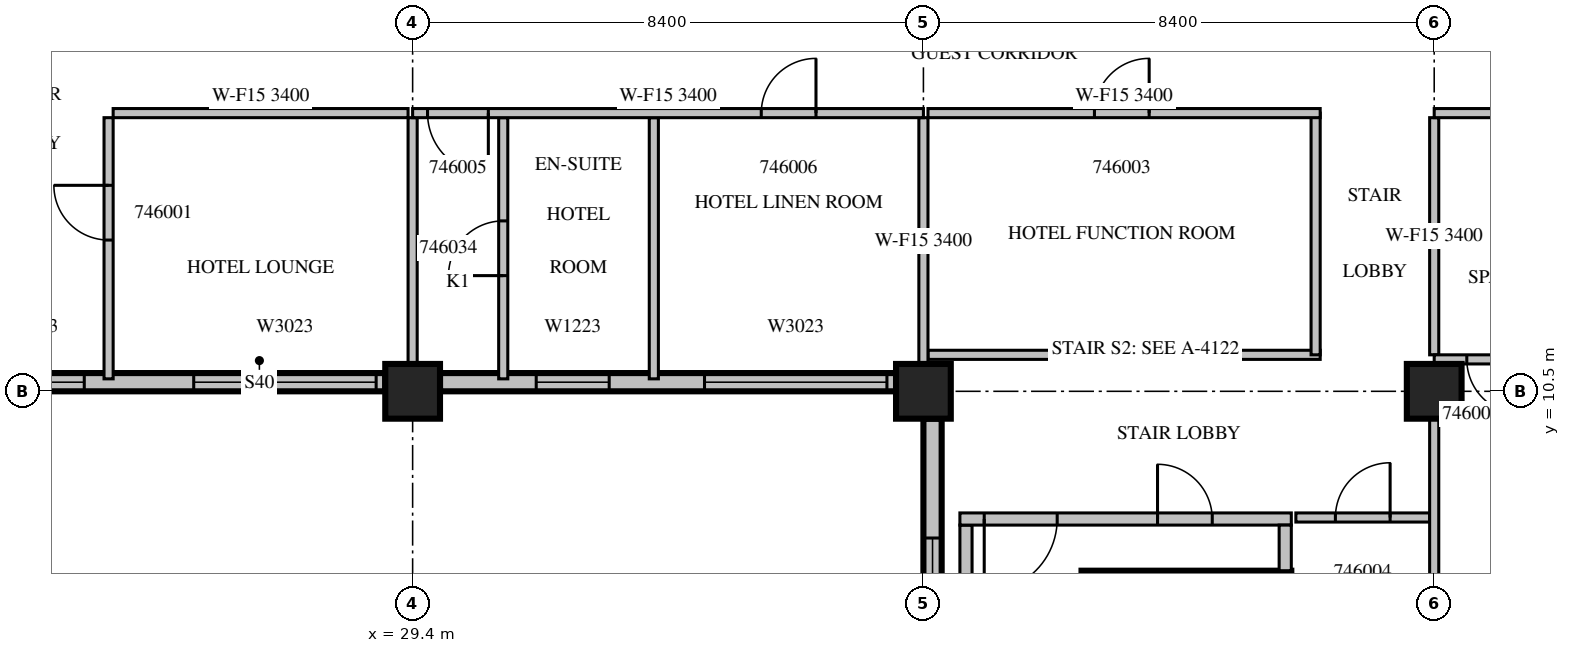
"""IFC4 building model, lengths in metres.
Left out: names, types, materials, properties, quantities, classifications, styles, units other than length and angle.
Written with IfcOpenShell. Run it as: python <this file> out.ifc"""

import sys

from ifc_helpers import new_model, si_unit, direction, frame, frame_2d, origin, origin_2d, place, context, subcontext, project, spatial, rectangle, extrude, source, transform, mapped, element, fill, save


model = new_model("IFC4")
c1 = context("Model", 3, precision=1e-05, world=origin(), true_north=direction((0.0, 1.0)))
c2 = subcontext(c1, "Body", "Model", "MODEL_VIEW")
j1 = project(units=[si_unit("LENGTHUNIT", "METRE"), si_unit("PLANEANGLEUNIT", "RADIAN")], contexts=[c1])
p1 = place(None, origin())
s1 = spatial("IfcSite", under=j1, at=p1, CompositionType="ELEMENT")
p2 = place(p1, origin())
s2 = spatial("IfcBuilding", under=s1, at=p2, CompositionType="ELEMENT")
p3 = place(p2, frame((0.0, 0.0, 208.2)))
s3 = spatial("IfcBuildingStorey", under=s2, at=p3, CompositionType="ELEMENT", Elevation=208.2)
m1 = source(origin(), c2, "Body", "SweptSolid", [
    extrude(rectangle(XDim=0.9, YDim=0.9, at=origin_2d()), origin(), (0.0, 0.0, 1.0), 3.8),
])
for number, where, z_axis, x_axis in (
    (1, (29.4, 10.5, 0.0), (0.0, 0.0, 1.0), (1.0, 0.0, 0.0)),
    (2, (37.8, 10.5, 0.0), (0.0, 0.0, 1.0), (1.0, 0.0, 0.0)),
    (3, (46.2, 10.5, 0.0), (0.0, 0.0, 1.0), (1.0, 0.0, 0.0)),
):
    element("IfcColumn", number, at=place(p3, frame(where, z_axis=z_axis, x_axis=x_axis)), inside=s3, PredefinedType="COLUMN", context=c2, shape_type="MappedRepresentation", body=[
        mapped(m1, transform((0.0, 0.0, 0.0), scale=1.0)),
    ])
m2 = source(origin(), c2, "Body", "SweptSolid", [
    extrude(rectangle(XDim=7.15, YDim=0.3, at=frame_2d((3.575, 0.0))), origin(), (0.0, 0.0, 1.0), 3.4),
])
p4 = place(p3, frame((21.8, 10.65, 0.0), z_axis=(0.0, 0.0, 1.0), x_axis=(1.0, 0.0, 0.0)))
e4 = element("IfcWall", 4, at=p4, inside=s3, PredefinedType="STANDARD", context=c2, shape_type="MappedRepresentation", body=[
    mapped(m2, transform((0.0, 0.0, 0.0), scale=1.0)),
])
m3 = source(origin(), c2, "Body", "SweptSolid", [
    extrude(rectangle(XDim=1.8, YDim=2.3, at=frame_2d((0.9, 1.15))), frame((0.0, 0.16, 0.0), z_axis=(0.0, -1.0, 0.0), x_axis=(1.0, 0.0, 0.0)), (0.0, 0.0, 1.0), 0.32),
])
p5 = place(p4, frame((0.4, 0.0, 0.6)))
e5 = element("IfcOpeningElement", 5, at=p5, cuts=e4, PredefinedType="OPENING", context=c2, shape_type="MappedRepresentation", body=[
    mapped(m3, transform((0.0, 0.0, 0.0), scale=1.0)),
])
m4 = source(origin(), c2, "Body", "SweptSolid", [
    extrude(rectangle(XDim=3.0, YDim=2.3, at=frame_2d((1.5, 1.15))), frame((0.0, 0.16, 0.0), z_axis=(0.0, -1.0, 0.0), x_axis=(1.0, 0.0, 0.0)), (0.0, 0.0, 1.0), 0.32),
])
p6 = place(p4, frame((4.0, 0.0, 0.6)))
e6 = element("IfcOpeningElement", 6, at=p6, cuts=e4, PredefinedType="OPENING", context=c2, shape_type="MappedRepresentation", body=[
    mapped(m4, transform((0.0, 0.0, 0.0), scale=1.0)),
])
m5 = source(origin(), c2, "Body", "SweptSolid", [
    extrude(rectangle(XDim=7.5, YDim=0.3, at=frame_2d((3.75, 0.0))), origin(), (0.0, 0.0, 1.0), 3.4),
])
p7 = place(p3, frame((29.85, 10.65, 0.0), z_axis=(0.0, 0.0, 1.0), x_axis=(1.0, 0.0, 0.0)))
e7 = element("IfcWall", 7, at=p7, inside=s3, PredefinedType="STANDARD", context=c2, shape_type="MappedRepresentation", body=[
    mapped(m5, transform((0.0, 0.0, 0.0), scale=1.0)),
])
m6 = source(origin(), c2, "Body", "SweptSolid", [
    extrude(rectangle(XDim=1.2, YDim=2.3, at=frame_2d((0.6, 1.15))), frame((0.0, 0.16, 0.0), z_axis=(0.0, -1.0, 0.0), x_axis=(1.0, 0.0, 0.0)), (0.0, 0.0, 1.0), 0.32),
])
p8 = place(p7, frame((1.583, 0.0, 0.6)))
e8 = element("IfcOpeningElement", 8, at=p8, cuts=e7, PredefinedType="OPENING", context=c2, shape_type="MappedRepresentation", body=[
    mapped(m6, transform((0.0, 0.0, 0.0), scale=1.0)),
])
p9 = place(p7, frame((4.35, 0.0, 0.6)))
e9 = element("IfcOpeningElement", 9, at=p9, cuts=e7, PredefinedType="OPENING", context=c2, shape_type="MappedRepresentation", body=[
    mapped(m4, transform((0.0, 0.0, 0.0), scale=1.0)),
])
m7 = source(origin(), c2, "Body", "SweptSolid", [
    extrude(rectangle(XDim=9.15, YDim=0.3, at=frame_2d((4.575, 0.0))), origin(), (0.0, 0.0, 1.0), 3.4),
])
p10 = place(p3, frame((37.95, 10.05, 0.0), z_axis=(0.0, 0.0, 1.0), x_axis=(0.0, -1.0, 0.0)))
e10 = element("IfcWall", 10, at=p10, inside=s3, PredefinedType="STANDARD", context=c2, shape_type="MappedRepresentation", body=[
    mapped(m7, transform((0.0, 0.0, 0.0), scale=1.0)),
])
p11 = place(p10, frame((1.962, 0.0, 0.6)))
e11 = element("IfcOpeningElement", 11, at=p11, cuts=e10, PredefinedType="OPENING", context=c2, shape_type="MappedRepresentation", body=[
    mapped(m3, transform((0.0, 0.0, 0.0), scale=1.0)),
])
p12 = place(p10, frame((5.925, 0.0, 0.6)))
e12 = element("IfcOpeningElement", 12, at=p12, cuts=e10, PredefinedType="OPENING", context=c2, shape_type="MappedRepresentation", body=[
    mapped(m4, transform((0.0, 0.0, 0.0), scale=1.0)),
])
m8 = source(origin(), c2, "Body", "SweptSolid", [
    extrude(rectangle(XDim=3.45, YDim=0.25, at=frame_2d((1.725, 0.0))), origin(), (0.0, 0.0, 1.0), 3.4),
])
p13 = place(p3, frame((40.4, 7.425, 0.0), z_axis=(0.0, 0.0, 1.0), x_axis=(1.0, 0.0, 0.0)))
e13 = element("IfcWall", 13, at=p13, inside=s3, PredefinedType="SOLIDWALL", context=c2, shape_type="MappedRepresentation", body=[
    mapped(m8, transform((0.0, 0.0, 0.0), scale=1.0)),
])
m9 = source(origin(), c2, "Body", "SweptSolid", [
    extrude(rectangle(XDim=8.0, YDim=0.2, at=frame_2d((4.0, 0.0))), origin(), (0.0, 0.0, 1.0), 3.4),
])
p14 = place(p3, frame((38.5, 0.3, 0.0), z_axis=(0.0, 0.0, 1.0), x_axis=(0.0, 1.0, 0.0)))
e14 = element("IfcWall", 14, at=p14, inside=s3, PredefinedType="PARTITIONING", context=c2, shape_type="MappedRepresentation", body=[
    mapped(m9, transform((0.0, 0.0, 0.0), scale=1.0)),
])
m10 = source(origin(), c2, "Body", "SweptSolid", [
    extrude(rectangle(XDim=5.45, YDim=0.2, at=frame_2d((2.725, 0.0))), origin(), (0.0, 0.0, 1.0), 3.4),
])
p15 = place(p3, frame((38.4, 8.4, 0.0), z_axis=(0.0, 0.0, 1.0), x_axis=(1.0, 0.0, 0.0)))
e15 = element("IfcWall", 15, at=p15, inside=s3, PredefinedType="PARTITIONING", context=c2, shape_type="MappedRepresentation", body=[
    mapped(m10, transform((0.0, 0.0, 0.0), scale=1.0)),
])
m11 = source(origin(), c2, "Body", "SweptSolid", [
    extrude(rectangle(XDim=1.2, YDim=2.1, at=frame_2d((0.6, 1.05))), frame((0.0, 0.11, 0.0), z_axis=(0.0, -1.0, 0.0), x_axis=(1.0, 0.0, 0.0)), (0.0, 0.0, 1.0), 0.22),
])
p16 = place(p15, frame((0.4, 0.0, 0.0)))
e16 = element("IfcOpeningElement", 16, at=p16, cuts=e15, PredefinedType="OPENING", context=c2, shape_type="MappedRepresentation", body=[
    mapped(m11, transform((0.0, 0.0, 0.0), scale=1.0)),
])
m12 = source(origin(), c2, "Body", "SweptSolid", [
    extrude(rectangle(XDim=0.9, YDim=2.1, at=frame_2d((0.45, 1.05))), frame((0.0, 0.11, 0.0), z_axis=(0.0, -1.0, 0.0), x_axis=(1.0, 0.0, 0.0)), (0.0, 0.0, 1.0), 0.22),
])
p17 = place(p15, frame((3.25, 0.0, 0.0)))
e17 = element("IfcOpeningElement", 17, at=p17, cuts=e15, PredefinedType="OPENING", context=c2, shape_type="MappedRepresentation", body=[
    mapped(m12, transform((0.0, 0.0, 0.0), scale=1.0)),
])
m13 = source(origin(), c2, "Body", "SweptSolid", [
    extrude(rectangle(XDim=0.75, YDim=0.2, at=frame_2d((0.375, 0.0))), origin(), (0.0, 0.0, 1.0), 3.4),
])
p18 = place(p3, frame((43.75, 7.55, 0.0), z_axis=(0.0, 0.0, 1.0), x_axis=(0.0, 1.0, 0.0)))
e18 = element("IfcWall", 18, at=p18, inside=s3, PredefinedType="PARTITIONING", context=c2, shape_type="MappedRepresentation", body=[
    mapped(m13, transform((0.0, 0.0, 0.0), scale=1.0)),
])
m14 = source(origin(), c2, "Body", "SweptSolid", [
    extrude(rectangle(XDim=4.295, YDim=0.15, at=frame_2d((2.147, 0.0))), origin(), (0.0, 0.0, 1.0), 3.4),
])
p19 = place(p3, frame((24.4, 15.0, 0.0), z_axis=(0.0, 0.0, 1.0), x_axis=(0.0, -1.0, 0.0)))
e19 = element("IfcWall", 19, at=p19, inside=s3, PredefinedType="PARTITIONING", context=c2, shape_type="MappedRepresentation", body=[
    mapped(m14, transform((0.0, 0.0, 0.0), scale=1.0)),
])
m15 = source(origin(), c2, "Body", "SweptSolid", [
    extrude(rectangle(XDim=0.9, YDim=2.1, at=frame_2d((0.45, 1.05))), frame((0.0, 0.085, 0.0), z_axis=(0.0, -1.0, 0.0), x_axis=(1.0, 0.0, 0.0)), (0.0, 0.0, 1.0), 0.17),
])
p20 = place(p19, frame((1.113, 0.0, 0.0)))
e20 = element("IfcOpeningElement", 20, at=p20, cuts=e19, PredefinedType="OPENING", context=c2, shape_type="MappedRepresentation", body=[
    mapped(m15, transform((0.0, 0.0, 0.0), scale=1.0)),
])
m16 = source(origin(), c2, "Body", "SweptSolid", [
    extrude(rectangle(XDim=4.85, YDim=0.15, at=frame_2d((2.425, 0.0))), origin(), (0.0, 0.0, 1.0), 3.4),
])
p21 = place(p3, frame((29.325, 15.075, 0.0), z_axis=(0.0, 0.0, 1.0), x_axis=(-1.0, 0.0, 0.0)))
e21 = element("IfcWall", 21, at=p21, inside=s3, PredefinedType="PARTITIONING", context=c2, shape_type="MappedRepresentation", body=[
    mapped(m16, transform((0.0, 0.0, 0.0), scale=1.0)),
])
m17 = source(origin(), c2, "Body", "SweptSolid", [
    extrude(rectangle(XDim=4.051, YDim=0.15, at=frame_2d((2.026, 0.0))), origin(), (0.0, 0.0, 1.0), 3.4),
])
p22 = place(p3, frame((29.4, 10.949, 0.0), z_axis=(0.0, 0.0, 1.0), x_axis=(0.0, 1.0, 0.0)))
e22 = element("IfcWall", 22, at=p22, inside=s3, PredefinedType="PARTITIONING", context=c2, shape_type="MappedRepresentation", body=[
    mapped(m17, transform((0.0, 0.0, 0.0), scale=1.0)),
])
m18 = source(origin(), c2, "Body", "SweptSolid", [
    extrude(rectangle(XDim=6.45, YDim=0.15, at=frame_2d((3.225, 0.0))), origin(), (0.0, 0.0, 1.0), 3.4),
])
p23 = place(p3, frame((37.875, 11.1, 0.0), z_axis=(0.0, 0.0, 1.0), x_axis=(1.0, 0.0, 0.0)))
e23 = element("IfcWall", 23, at=p23, inside=s3, PredefinedType="PARTITIONING", context=c2, shape_type="MappedRepresentation", body=[
    mapped(m18, transform((0.0, 0.0, 0.0), scale=1.0)),
])
m19 = source(origin(), c2, "Body", "SweptSolid", [
    extrude(rectangle(XDim=3.975, YDim=0.15, at=frame_2d((1.988, 0.0))), origin(), (0.0, 0.0, 1.0), 3.4),
])
p24 = place(p3, frame((44.25, 11.1, 0.0), z_axis=(0.0, 0.0, 1.0), x_axis=(0.0, 1.0, 0.0)))
e24 = element("IfcWall", 24, at=p24, inside=s3, PredefinedType="PARTITIONING", context=c2, shape_type="MappedRepresentation", body=[
    mapped(m19, transform((0.0, 0.0, 0.0), scale=1.0)),
])
p25 = place(p3, frame((44.325, 15.075, 0.0), z_axis=(0.0, 0.0, 1.0), x_axis=(-1.0, 0.0, 0.0)))
e25 = element("IfcWall", 25, at=p25, inside=s3, PredefinedType="PARTITIONING", context=c2, shape_type="MappedRepresentation", body=[
    mapped(m18, transform((0.0, 0.0, 0.0), scale=1.0)),
])
p26 = place(p25, frame((2.812, 0.0, 0.0)))
e26 = element("IfcOpeningElement", 26, at=p26, cuts=e25, PredefinedType="OPENING", context=c2, shape_type="MappedRepresentation", body=[
    mapped(m15, transform((0.0, 0.0, 0.0), scale=1.0)),
])
m20 = source(origin(), c2, "Body", "SweptSolid", [
    extrude(rectangle(XDim=2.2, YDim=0.15, at=frame_2d((1.1, 0.0))), origin(), (0.0, 0.0, 1.0), 3.4),
])
p27 = place(p3, frame((46.125, 8.425, 0.0), z_axis=(0.0, 0.0, 1.0), x_axis=(-1.0, 0.0, 0.0)))
e27 = element("IfcWall", 27, at=p27, inside=s3, PredefinedType="PARTITIONING", context=c2, shape_type="MappedRepresentation", body=[
    mapped(m20, transform((0.0, 0.0, 0.0), scale=1.0)),
])
p28 = place(p27, frame((0.65, 0.0, 0.0)))
e28 = element("IfcOpeningElement", 28, at=p28, cuts=e27, PredefinedType="OPENING", context=c2, shape_type="MappedRepresentation", body=[
    mapped(m15, transform((0.0, 0.0, 0.0), scale=1.0)),
])
p29 = place(p3, frame((30.89, 10.705, 0.0), z_axis=(0.0, 0.0, 1.0), x_axis=(0.0, 1.0, 0.0)))
e29 = element("IfcWall", 29, at=p29, inside=s3, PredefinedType="PARTITIONING", context=c2, shape_type="MappedRepresentation", body=[
    mapped(m14, transform((0.0, 0.0, 0.0), scale=1.0)),
])
p30 = place(p29, frame((1.698, 0.0, 0.0)))
e30 = element("IfcOpeningElement", 30, at=p30, cuts=e29, PredefinedType="OPENING", context=c2, shape_type="MappedRepresentation", body=[
    mapped(m15, transform((0.0, 0.0, 0.0), scale=1.0)),
])
p31 = place(p3, frame((33.367, 10.705, 0.0), z_axis=(0.0, 0.0, 1.0), x_axis=(0.0, 1.0, 0.0)))
e31 = element("IfcWall", 31, at=p31, inside=s3, PredefinedType="PARTITIONING", context=c2, shape_type="MappedRepresentation", body=[
    mapped(m14, transform((0.0, 0.0, 0.0), scale=1.0)),
])
p32 = place(p3, frame((37.8, 10.949, 0.0), z_axis=(0.0, 0.0, 1.0), x_axis=(0.0, 1.0, 0.0)))
e32 = element("IfcWall", 32, at=p32, inside=s3, PredefinedType="PARTITIONING", context=c2, shape_type="MappedRepresentation", body=[
    mapped(m17, transform((0.0, 0.0, 0.0), scale=1.0)),
])
m21 = source(origin(), c2, "Body", "SweptSolid", [
    extrude(rectangle(XDim=9.152, YDim=0.15, at=frame_2d((4.576, 0.0))), origin(), (0.0, 0.0, 1.0), 3.4),
])
p33 = place(p3, frame((46.2, 0.899, 0.0), z_axis=(0.0, 0.0, 1.0), x_axis=(0.0, 1.0, 0.0)))
e33 = element("IfcWall", 33, at=p33, inside=s3, PredefinedType="PARTITIONING", context=c2, shape_type="MappedRepresentation", body=[
    mapped(m21, transform((0.0, 0.0, 0.0), scale=1.0)),
])
m22 = source(origin(), c2, "Body", "SweptSolid", [
    extrude(rectangle(XDim=3.9, YDim=0.15, at=frame_2d((1.95, 0.0))), origin(), (0.0, 0.0, 1.0), 3.4),
])
p34 = place(p3, frame((46.2, 11.1, 0.0), z_axis=(0.0, 0.0, 1.0), x_axis=(0.0, 1.0, 0.0)))
e34 = element("IfcWall", 34, at=p34, inside=s3, PredefinedType="PARTITIONING", context=c2, shape_type="MappedRepresentation", body=[
    mapped(m22, transform((0.0, 0.0, 0.0), scale=1.0)),
])
m23 = source(origin(), c2, "Body", "SweptSolid", [
    extrude(rectangle(XDim=7.355, YDim=0.15, at=frame_2d((3.678, 0.0))), origin(), (0.0, 0.0, 1.0), 3.4),
])
p35 = place(p3, frame((53.555, 11.025, 0.0), z_axis=(0.0, 0.0, 1.0), x_axis=(-1.0, 0.0, 0.0)))
e35 = element("IfcWall", 35, at=p35, inside=s3, PredefinedType="PARTITIONING", context=c2, shape_type="MappedRepresentation", body=[
    mapped(m23, transform((0.0, 0.0, 0.0), scale=1.0)),
])
m24 = source(origin(), c2, "Body", "SweptSolid", [
    extrude(rectangle(XDim=1.0, YDim=2.1, at=frame_2d((0.5, 1.05))), frame((0.0, 0.085, 0.0), z_axis=(0.0, -1.0, 0.0), x_axis=(1.0, 0.0, 0.0)), (0.0, 0.0, 1.0), 0.17),
])
p36 = place(p35, frame((4.869, 0.0, 0.0)))
e36 = element("IfcOpeningElement", 36, at=p36, cuts=e35, PredefinedType="OPENING", context=c2, shape_type="MappedRepresentation", body=[
    mapped(m24, transform((0.0, 0.0, 0.0), scale=1.0)),
])
p37 = place(p35, frame((5.919, 0.0, 0.0)))
e37 = element("IfcOpeningElement", 37, at=p37, cuts=e35, PredefinedType="OPENING", context=c2, shape_type="MappedRepresentation", body=[
    mapped(m15, transform((0.0, 0.0, 0.0), scale=1.0)),
])
m25 = source(origin(), c2, "Body", "SweptSolid", [
    extrude(rectangle(XDim=8.4, YDim=0.15, at=frame_2d((4.2, 0.0))), origin(), (0.0, 0.0, 1.0), 3.4),
])
p38 = place(p3, frame((37.8, 15.075, 0.0), z_axis=(0.0, 0.0, 1.0), x_axis=(-1.0, 0.0, 0.0)))
e38 = element("IfcWall", 38, at=p38, inside=s3, PredefinedType="PARTITIONING", context=c2, shape_type="MappedRepresentation", body=[
    mapped(m25, transform((0.0, 0.0, 0.0), scale=1.0)),
])
p39 = place(p38, frame((7.155, 0.0, 0.0)))
e39 = element("IfcOpeningElement", 39, at=p39, cuts=e38, PredefinedType="OPENING", context=c2, shape_type="MappedRepresentation", body=[
    mapped(m24, transform((0.0, 0.0, 0.0), scale=1.0)),
])
p40 = place(p38, frame((1.767, 0.0, 0.0)))
e40 = element("IfcOpeningElement", 40, at=p40, cuts=e38, PredefinedType="OPENING", context=c2, shape_type="MappedRepresentation", body=[
    mapped(m15, transform((0.0, 0.0, 0.0), scale=1.0)),
])
p41 = place(p3, frame((53.555, 15.075, 0.0), z_axis=(0.0, 0.0, 1.0), x_axis=(-1.0, 0.0, 0.0)))
e41 = element("IfcWall", 41, at=p41, inside=s3, PredefinedType="PARTITIONING", context=c2, shape_type="MappedRepresentation", body=[
    mapped(m23, transform((0.0, 0.0, 0.0), scale=1.0)),
])
m26 = source(origin(), c2, "Body", "SweptSolid", [
    extrude(rectangle(XDim=1.2, YDim=2.1, at=frame_2d((0.6, 1.05))), frame((0.0, 0.085, 0.0), z_axis=(0.0, -1.0, 0.0), x_axis=(1.0, 0.0, 0.0)), (0.0, 0.0, 1.0), 0.17),
])
p42 = place(p41, frame((5.006, 0.0, 0.0)))
e42 = element("IfcOpeningElement", 42, at=p42, cuts=e41, PredefinedType="OPENING", context=c2, shape_type="MappedRepresentation", body=[
    mapped(m26, transform((0.0, 0.0, 0.0), scale=1.0)),
])
p43 = place(p41, frame((2.124, 0.0, 0.0)))
e43 = element("IfcOpeningElement", 43, at=p43, cuts=e41, PredefinedType="OPENING", context=c2, shape_type="MappedRepresentation", body=[
    mapped(m15, transform((0.0, 0.0, 0.0), scale=1.0)),
])
m27 = source(origin(), c2, "Body", "SweptSolid", [
    extrude(rectangle(XDim=1.8, YDim=2.3, at=frame_2d((0.9, 1.15))), frame((0.0, 0.03, 0.0), z_axis=(0.0, -1.0, 0.0), x_axis=(1.0, 0.0, 0.0)), (0.0, 0.0, 1.0), 0.06),
])
p44 = place(p5, origin())
e44 = element("IfcWindow", 44, at=p44, inside=s3, PartitioningType="SINGLE_PANEL", PredefinedType="WINDOW", context=c2, shape_type="MappedRepresentation", body=[
    mapped(m27, transform((0.0, 0.0, 0.0), scale=1.0)),
])
fill(e5, e44)
m28 = source(origin(), c2, "Body", "SweptSolid", [
    extrude(rectangle(XDim=3.0, YDim=2.3, at=frame_2d((1.5, 1.15))), frame((0.0, 0.03, 0.0), z_axis=(0.0, -1.0, 0.0), x_axis=(1.0, 0.0, 0.0)), (0.0, 0.0, 1.0), 0.06),
])
p45 = place(p6, origin())
e45 = element("IfcWindow", 45, at=p45, inside=s3, PartitioningType="SINGLE_PANEL", PredefinedType="WINDOW", context=c2, shape_type="MappedRepresentation", body=[
    mapped(m28, transform((0.0, 0.0, 0.0), scale=1.0)),
])
fill(e6, e45)
m29 = source(origin(), c2, "Body", "SweptSolid", [
    extrude(rectangle(XDim=1.2, YDim=2.3, at=frame_2d((0.6, 1.15))), frame((0.0, 0.03, 0.0), z_axis=(0.0, -1.0, 0.0), x_axis=(1.0, 0.0, 0.0)), (0.0, 0.0, 1.0), 0.06),
])
p46 = place(p8, origin())
e46 = element("IfcWindow", 46, at=p46, inside=s3, PartitioningType="SINGLE_PANEL", PredefinedType="WINDOW", context=c2, shape_type="MappedRepresentation", body=[
    mapped(m29, transform((0.0, 0.0, 0.0), scale=1.0)),
])
fill(e8, e46)
p47 = place(p9, origin())
e47 = element("IfcWindow", 47, at=p47, inside=s3, PartitioningType="SINGLE_PANEL", PredefinedType="WINDOW", context=c2, shape_type="MappedRepresentation", body=[
    mapped(m28, transform((0.0, 0.0, 0.0), scale=1.0)),
])
fill(e9, e47)
p48 = place(p11, origin())
e48 = element("IfcWindow", 48, at=p48, inside=s3, PartitioningType="SINGLE_PANEL", PredefinedType="WINDOW", context=c2, shape_type="MappedRepresentation", body=[
    mapped(m27, transform((0.0, 0.0, 0.0), scale=1.0)),
])
fill(e11, e48)
m30 = source(origin(), c2, "Body", "SweptSolid", [
    extrude(rectangle(XDim=1.2, YDim=2.1, at=frame_2d((0.6, 1.05))), frame((0.0, 0.025, 0.0), z_axis=(0.0, -1.0, 0.0), x_axis=(1.0, 0.0, 0.0)), (0.0, 0.0, 1.0), 0.05),
])
p49 = place(p16, origin())
e49 = element("IfcDoor", 49, at=p49, inside=s3, OperationType="SINGLE_SWING_RIGHT", PredefinedType="DOOR", context=c2, shape_type="MappedRepresentation", body=[
    mapped(m30, transform((0.0, 0.0, 0.0), scale=1.0)),
])
fill(e16, e49)
m31 = source(origin(), c2, "Body", "SweptSolid", [
    extrude(rectangle(XDim=0.9, YDim=2.1, at=frame_2d((0.45, 1.05))), frame((0.0, 0.025, 0.0), z_axis=(0.0, -1.0, 0.0), x_axis=(1.0, 0.0, 0.0)), (0.0, 0.0, 1.0), 0.05),
])
p50 = place(p17, origin())
e50 = element("IfcDoor", 50, at=p50, inside=s3, OperationType="SINGLE_SWING_LEFT", PredefinedType="DOOR", context=c2, shape_type="MappedRepresentation", body=[
    mapped(m31, transform((0.0, 0.0, 0.0), scale=1.0)),
])
fill(e17, e50)
p51 = place(p20, origin())
e51 = element("IfcDoor", 51, at=p51, inside=s3, OperationType="SINGLE_SWING_RIGHT", PredefinedType="DOOR", context=c2, shape_type="MappedRepresentation", body=[
    mapped(m31, transform((0.0, 0.0, 0.0), scale=1.0)),
])
fill(e20, e51)
p52 = place(p26, origin())
e52 = element("IfcDoor", 52, at=p52, inside=s3, OperationType="SINGLE_SWING_RIGHT", PredefinedType="DOOR", context=c2, shape_type="MappedRepresentation", body=[
    mapped(m31, transform((0.0, 0.0, 0.0), scale=1.0)),
])
fill(e26, e52)
p53 = place(p28, origin())
e53 = element("IfcDoor", 53, at=p53, inside=s3, OperationType="SINGLE_SWING_RIGHT", PredefinedType="DOOR", context=c2, shape_type="MappedRepresentation", body=[
    mapped(m31, transform((0.0, 0.0, 0.0), scale=1.0)),
])
fill(e28, e53)
m32 = source(origin(), c2, "Body", "SweptSolid", [
    extrude(rectangle(XDim=1.0, YDim=2.1, at=frame_2d((0.5, 1.05))), frame((0.0, 0.025, 0.0), z_axis=(0.0, -1.0, 0.0), x_axis=(1.0, 0.0, 0.0)), (0.0, 0.0, 1.0), 0.05),
])
p54 = place(p39, origin())
e54 = element("IfcDoor", 54, at=p54, inside=s3, OperationType="SINGLE_SWING_LEFT", PredefinedType="DOOR", context=c2, shape_type="MappedRepresentation", body=[
    mapped(m32, transform((0.0, 0.0, 0.0), scale=1.0)),
])
fill(e39, e54)
p55 = place(p40, origin())
e55 = element("IfcDoor", 55, at=p55, inside=s3, OperationType="SINGLE_SWING_RIGHT", PredefinedType="DOOR", context=c2, shape_type="MappedRepresentation", body=[
    mapped(m31, transform((0.0, 0.0, 0.0), scale=1.0)),
])
fill(e40, e55)
p56 = place(p37, origin())
e56 = element("IfcDoor", 56, at=p56, inside=s3, OperationType="SINGLE_SWING_LEFT", PredefinedType="DOOR", context=c2, shape_type="MappedRepresentation", body=[
    mapped(m31, transform((0.0, 0.0, 0.0), scale=1.0)),
])
fill(e37, e56)
p57 = place(p30, origin())
e57 = element("IfcDoor", 57, at=p57, inside=s3, OperationType="SINGLE_SWING_LEFT", PredefinedType="DOOR", context=c2, shape_type="MappedRepresentation", body=[
    mapped(m31, transform((0.0, 0.0, 0.0), scale=1.0)),
])
fill(e30, e57)
save(model, sys.argv[1])
